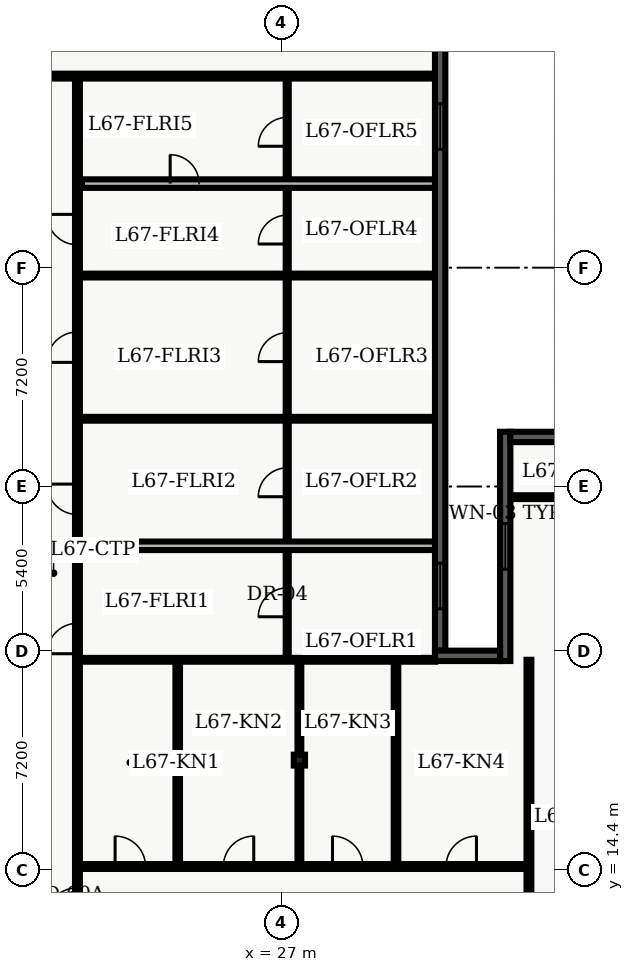
"""IFC4 building model, lengths in metres.
Left out: names, types, materials, properties, quantities, classifications, styles, units other than length and angle.
Written with IfcOpenShell. Run it as: python <this file> out.ifc"""

import sys

from ifc_helpers import new_model, entity, si_unit, converted_unit, direction, frame, origin_with_axes, origin_2d_with_axis, place, context, subcontext, project, spatial, polyline, rectangle, i_section, outline, extrude, element, fill, save


model = new_model("IFC4")
c1 = context("Model", 3, precision=1e-05, world=origin_with_axes(), true_north=direction((0.0, 1.0)))
c2 = subcontext(c1, "Body", "Model", "MODEL_VIEW")
j1 = project(units=[si_unit("LENGTHUNIT", "METRE"), converted_unit("PLANEANGLEUNIT", "DEGREE", entity("IfcPlaneAngleMeasure", 0.017), si_unit("PLANEANGLEUNIT", "RADIAN"), dimensions=[0, 0, 0, 0, 0, 0, 0])], contexts=[c1])
p1 = place(None, origin_with_axes())
s1 = spatial("IfcSite", under=j1, at=p1, CompositionType="ELEMENT")
p2 = place(p1, origin_with_axes())
s2 = spatial("IfcBuilding", under=s1, at=p2, CompositionType="ELEMENT")
p3 = place(p2, frame((0.0, 0.0, 272.4), z_axis=(0.0, 0.0, 1.0), x_axis=(1.0, 0.0, 0.0)))
s3 = spatial("IfcBuildingStorey", under=s2, at=p3, CompositionType="ELEMENT", Elevation=272.4)
p4 = place(p3, frame((27.6, 18.0, 0.0), z_axis=(0.0, 0.0, 1.0), x_axis=(1.0, 0.0, 0.0)))
e1 = element("IfcColumn", 1, at=p4, inside=s3, PredefinedType="COLUMN", context=c2, shape_type="SweptSolid", body=[
    extrude(i_section(OverallWidth=0.369, OverallDepth=0.356, WebThickness=0.011, FlangeThickness=0.018, FilletRadius=0.018, at=origin_2d_with_axis()), origin_with_axes(), (0.0, 0.0, 1.0), 3.9),
])
p5 = place(p3, frame((8.135, 40.5, 0.0), z_axis=(0.0, 0.0, 1.0), x_axis=(1.0, 0.0, 0.0)))
e2 = element("IfcWall", 2, at=p5, inside=s3, PredefinedType="PARTITIONING", context=c2, shape_type="SweptSolid", body=[
    extrude(outline(polyline([(0.0, -0.08), (23.93, -0.08), (23.93, 0.08), (0.0, 0.08), (0.0, -0.08)])), origin_with_axes(), (0.0, 0.0, 1.0), 2.7),
])
p6 = place(p5, frame((0.76, 0.0, 0.0), z_axis=(0.0, 0.0, 1.0), x_axis=(1.0, 0.0, 0.0)))
e3 = element("IfcOpeningElement", 3, at=p6, cuts=e2, PredefinedType="OPENING", context=c2, shape_type="SweptSolid", body=[
    extrude(rectangle(XDim=1.0, YDim=0.18, at=origin_2d_with_axis()), origin_with_axes(), (0.0, 0.0, 1.0), 2.15),
])
p7 = place(p5, frame((4.729, 0.0, 0.0), z_axis=(0.0, 0.0, 1.0), x_axis=(1.0, 0.0, 0.0)))
e4 = element("IfcOpeningElement", 4, at=p7, cuts=e2, PredefinedType="OPENING", context=c2, shape_type="SweptSolid", body=[
    extrude(rectangle(XDim=1.0, YDim=0.18, at=origin_2d_with_axis()), origin_with_axes(), (0.0, 0.0, 1.0), 2.15),
])
p8 = place(p5, frame((7.574, 0.0, 0.0), z_axis=(0.0, 0.0, 1.0), x_axis=(1.0, 0.0, 0.0)))
e5 = element("IfcOpeningElement", 5, at=p8, cuts=e2, PredefinedType="OPENING", context=c2, shape_type="SweptSolid", body=[
    extrude(rectangle(XDim=1.0, YDim=0.18, at=origin_2d_with_axis()), origin_with_axes(), (0.0, 0.0, 1.0), 2.15),
])
p9 = place(p5, frame((10.189, 0.0, 0.0), z_axis=(0.0, 0.0, 1.0), x_axis=(1.0, 0.0, 0.0)))
e6 = element("IfcOpeningElement", 6, at=p9, cuts=e2, PredefinedType="OPENING", context=c2, shape_type="SweptSolid", body=[
    extrude(rectangle(XDim=1.0, YDim=0.18, at=origin_2d_with_axis()), origin_with_axes(), (0.0, 0.0, 1.0), 2.15),
])
p10 = place(p3, frame((20.3, 7.8, 0.0), z_axis=(0.0, 0.0, 1.0), x_axis=(0.0, 1.0, 0.0)))
e7 = element("IfcWall", 7, at=p10, inside=s3, PredefinedType="PARTITIONING", context=c2, shape_type="SweptSolid", body=[
    extrude(outline(polyline([(0.0, -0.08), (32.7, -0.08), (32.7, 0.08), (0.0, 0.08), (0.0, -0.08)])), origin_with_axes(), (0.0, 0.0, 1.0), 2.7),
])
p11 = place(p10, frame((14.2, 0.0, 0.0), z_axis=(0.0, 0.0, 1.0), x_axis=(1.0, 0.0, 0.0)))
e8 = element("IfcOpeningElement", 8, at=p11, cuts=e7, PredefinedType="OPENING", context=c2, shape_type="SweptSolid", body=[
    extrude(rectangle(XDim=1.0, YDim=0.18, at=origin_2d_with_axis()), origin_with_axes(), (0.0, 0.0, 1.0), 2.15),
])
p12 = place(p10, frame((18.779, 0.0, 0.0), z_axis=(0.0, 0.0, 1.0), x_axis=(1.0, 0.0, 0.0)))
e9 = element("IfcOpeningElement", 9, at=p12, cuts=e7, PredefinedType="OPENING", context=c2, shape_type="SweptSolid", body=[
    extrude(rectangle(XDim=1.0, YDim=0.18, at=origin_2d_with_axis()), origin_with_axes(), (0.0, 0.0, 1.0), 2.15),
])
p13 = place(p10, frame((23.784, 0.0, 0.0), z_axis=(0.0, 0.0, 1.0), x_axis=(1.0, 0.0, 0.0)))
e10 = element("IfcOpeningElement", 10, at=p13, cuts=e7, PredefinedType="OPENING", context=c2, shape_type="SweptSolid", body=[
    extrude(rectangle(XDim=1.0, YDim=0.18, at=origin_2d_with_axis()), origin_with_axes(), (0.0, 0.0, 1.0), 2.15),
])
p14 = place(p10, frame((27.651, 0.0, 0.0), z_axis=(0.0, 0.0, 1.0), x_axis=(1.0, 0.0, 0.0)))
e11 = element("IfcOpeningElement", 11, at=p14, cuts=e7, PredefinedType="OPENING", context=c2, shape_type="SweptSolid", body=[
    extrude(rectangle(XDim=1.0, YDim=0.18, at=origin_2d_with_axis()), origin_with_axes(), (0.0, 0.0, 1.0), 2.15),
])
p15 = place(p10, frame((5.475, 0.0, 0.0), z_axis=(0.0, 0.0, 1.0), x_axis=(1.0, 0.0, 0.0)))
e12 = element("IfcOpeningElement", 12, at=p15, cuts=e7, PredefinedType="OPENING", context=c2, shape_type="SweptSolid", body=[
    extrude(rectangle(XDim=1.05, YDim=0.18, at=origin_2d_with_axis()), origin_with_axes(), (0.0, 0.0, 1.0), 2.15),
])
p16 = place(p3, frame((27.2, 21.4, 0.0), z_axis=(0.0, 0.0, 1.0), x_axis=(0.0, 1.0, 0.0)))
e13 = element("IfcWall", 13, at=p16, inside=s3, PredefinedType="PARTITIONING", context=c2, shape_type="SweptSolid", body=[
    extrude(outline(polyline([(0.0, -0.05), (18.9, -0.05), (18.9, 0.05), (0.0, 0.05), (0.0, -0.05)])), origin_with_axes(), (0.0, 0.0, 1.0), 2.7),
])
p17 = place(p16, frame((1.79, 0.0, 0.0), z_axis=(0.0, 0.0, 1.0), x_axis=(1.0, 0.0, 0.0)))
e14 = element("IfcOpeningElement", 14, at=p17, cuts=e13, PredefinedType="OPENING", context=c2, shape_type="SweptSolid", body=[
    extrude(rectangle(XDim=0.95, YDim=0.12, at=origin_2d_with_axis()), origin_with_axes(), (0.0, 0.0, 1.0), 2.15),
])
p18 = place(p16, frame((5.739, 0.0, 0.0), z_axis=(0.0, 0.0, 1.0), x_axis=(1.0, 0.0, 0.0)))
e15 = element("IfcOpeningElement", 15, at=p18, cuts=e13, PredefinedType="OPENING", context=c2, shape_type="SweptSolid", body=[
    extrude(rectangle(XDim=0.95, YDim=0.12, at=origin_2d_with_axis()), origin_with_axes(), (0.0, 0.0, 1.0), 2.15),
])
p19 = place(p16, frame((10.184, 0.0, 0.0), z_axis=(0.0, 0.0, 1.0), x_axis=(1.0, 0.0, 0.0)))
e16 = element("IfcOpeningElement", 16, at=p19, cuts=e13, PredefinedType="OPENING", context=c2, shape_type="SweptSolid", body=[
    extrude(rectangle(XDim=0.95, YDim=0.12, at=origin_2d_with_axis()), origin_with_axes(), (0.0, 0.0, 1.0), 2.15),
])
p20 = place(p16, frame((14.052, 0.0, 0.0), z_axis=(0.0, 0.0, 1.0), x_axis=(1.0, 0.0, 0.0)))
e17 = element("IfcOpeningElement", 17, at=p20, cuts=e13, PredefinedType="OPENING", context=c2, shape_type="SweptSolid", body=[
    extrude(rectangle(XDim=0.95, YDim=0.12, at=origin_2d_with_axis()), origin_with_axes(), (0.0, 0.0, 1.0), 2.15),
])
p21 = place(p16, frame((17.267, 0.0, 0.0), z_axis=(0.0, 0.0, 1.0), x_axis=(1.0, 0.0, 0.0)))
e18 = element("IfcOpeningElement", 18, at=p21, cuts=e13, PredefinedType="OPENING", context=c2, shape_type="SweptSolid", body=[
    extrude(rectangle(XDim=0.95, YDim=0.12, at=origin_2d_with_axis()), origin_with_axes(), (0.0, 0.0, 1.0), 2.15),
])
p22 = place(p3, frame((20.45, 25.05, 0.0), z_axis=(0.0, 0.0, 1.0), x_axis=(1.0, 0.0, 0.0)))
e19 = element("IfcWall", 19, at=p22, inside=s3, PredefinedType="PARTITIONING", context=c2, shape_type="SweptSolid", body=[
    extrude(outline(polyline([(0.0, -0.14), (11.615, -0.14), (11.615, 0.14), (0.0, 0.14), (0.0, -0.14)])), origin_with_axes(), (0.0, 0.0, 1.0), 2.7),
])
for number, where, z_axis, x_axis in (
    (20, (20.45, 29.228, 0.0), (0.0, 0.0, 1.0), (1.0, 0.0, 0.0)),
    (21, (20.45, 33.939, 0.0), (0.0, 0.0, 1.0), (1.0, 0.0, 0.0)),
):
    element("IfcWall", number, at=place(p3, frame(where, z_axis=z_axis, x_axis=x_axis)), inside=s3, PredefinedType="PARTITIONING", context=c2, shape_type="SweptSolid", body=[
        extrude(outline(polyline([(0.0, -0.062), (11.615, -0.062), (11.615, 0.062), (0.0, 0.062), (0.0, -0.062)])), origin_with_axes(), (0.0, 0.0, 1.0), 2.7),
    ])
p23 = place(p3, frame((20.45, 36.964, 0.0), z_axis=(0.0, 0.0, 1.0), x_axis=(1.0, 0.0, 0.0)))
e22 = element("IfcWall", 22, at=p23, inside=s3, PredefinedType="PARTITIONING", context=c2, shape_type="SweptSolid", body=[
    extrude(outline(polyline([(0.0, -0.14), (11.615, -0.14), (11.615, 0.14), (0.0, 0.14), (0.0, -0.14)])), origin_with_axes(), (0.0, 0.0, 1.0), 2.7),
])
p24 = place(p23, frame((3.375, 0.0, 0.0), z_axis=(0.0, 0.0, 1.0), x_axis=(1.0, 0.0, 0.0)))
e23 = element("IfcOpeningElement", 23, at=p24, cuts=e22, PredefinedType="OPENING", context=c2, shape_type="SweptSolid", body=[
    extrude(rectangle(XDim=0.95, YDim=0.3, at=origin_2d_with_axis()), origin_with_axes(), (0.0, 0.0, 1.0), 2.15),
])
p25 = place(p3, frame((20.3, 14.5, 0.0), z_axis=(0.0, 0.0, 1.0), x_axis=(1.0, 0.0, 0.0)))
e24 = element("IfcWall", 24, at=p25, inside=s3, PredefinedType="PARTITIONING", context=c2, shape_type="SweptSolid", body=[
    extrude(outline(polyline([(0.0, -0.08), (14.85, -0.08), (14.85, 0.08), (0.0, 0.08), (0.0, -0.08)])), origin_with_axes(), (0.0, 0.0, 1.0), 2.7),
])
p26 = place(p25, frame((1.739, 0.0, 0.0), z_axis=(0.0, 0.0, 1.0), x_axis=(1.0, 0.0, 0.0)))
e25 = element("IfcOpeningElement", 25, at=p26, cuts=e24, PredefinedType="OPENING", context=c2, shape_type="SweptSolid", body=[
    extrude(rectangle(XDim=1.0, YDim=0.18, at=origin_2d_with_axis()), origin_with_axes(), (0.0, 0.0, 1.0), 2.15),
])
p27 = place(p25, frame((5.299, 0.0, 0.0), z_axis=(0.0, 0.0, 1.0), x_axis=(1.0, 0.0, 0.0)))
e26 = element("IfcOpeningElement", 26, at=p27, cuts=e24, PredefinedType="OPENING", context=c2, shape_type="SweptSolid", body=[
    extrude(rectangle(XDim=1.0, YDim=0.18, at=origin_2d_with_axis()), origin_with_axes(), (0.0, 0.0, 1.0), 2.15),
])
p28 = place(p25, frame((8.889, 0.0, 0.0), z_axis=(0.0, 0.0, 1.0), x_axis=(1.0, 0.0, 0.0)))
e27 = element("IfcOpeningElement", 27, at=p28, cuts=e24, PredefinedType="OPENING", context=c2, shape_type="SweptSolid", body=[
    extrude(rectangle(XDim=1.0, YDim=0.18, at=origin_2d_with_axis()), origin_with_axes(), (0.0, 0.0, 1.0), 2.15),
])
p29 = place(p25, frame((12.624, 0.0, 0.0), z_axis=(0.0, 0.0, 1.0), x_axis=(1.0, 0.0, 0.0)))
e28 = element("IfcOpeningElement", 28, at=p29, cuts=e24, PredefinedType="OPENING", context=c2, shape_type="SweptSolid", body=[
    extrude(rectangle(XDim=1.0, YDim=0.18, at=origin_2d_with_axis()), origin_with_axes(), (0.0, 0.0, 1.0), 2.15),
])
p30 = place(p3, frame((35.15, 4.35, 0.0), z_axis=(0.0, 0.0, 1.0), x_axis=(0.0, 1.0, 0.0)))
e29 = element("IfcWall", 29, at=p30, inside=s3, PredefinedType="PARTITIONING", context=c2, shape_type="SweptSolid", body=[
    extrude(outline(polyline([(0.0, -0.08), (16.95, -0.08), (16.95, 0.08), (0.0, 0.08), (0.0, -0.08)])), origin_with_axes(), (0.0, 0.0, 1.0), 2.7),
])
p31 = place(p3, frame((23.598, 14.62, 0.0), z_axis=(0.0, 0.0, 1.0), x_axis=(0.0, 1.0, 0.0)))
e30 = element("IfcWall", 30, at=p31, inside=s3, PredefinedType="PARTITIONING", context=c2, shape_type="SweptSolid", body=[
    extrude(outline(polyline([(0.0, -0.075), (6.6, -0.075), (6.6, 0.075), (0.0, 0.075), (0.0, -0.075)])), origin_with_axes(), (0.0, 0.0, 1.0), 2.7),
])
p32 = place(p3, frame((27.6, 14.62, 0.0), z_axis=(0.0, 0.0, 1.0), x_axis=(0.0, 1.0, 0.0)))
e31 = element("IfcWall", 31, at=p32, inside=s3, PredefinedType="PARTITIONING", context=c2, shape_type="SweptSolid", body=[
    extrude(outline(polyline([(0.0, -0.062), (6.6, -0.062), (6.6, 0.062), (0.0, 0.062), (0.0, -0.062)])), origin_with_axes(), (0.0, 0.0, 1.0), 2.7),
])
p33 = place(p3, frame((30.778, 14.62, 0.0), z_axis=(0.0, 0.0, 1.0), x_axis=(0.0, 1.0, 0.0)))
e32 = element("IfcWall", 32, at=p33, inside=s3, PredefinedType="PARTITIONING", context=c2, shape_type="SweptSolid", body=[
    extrude(outline(polyline([(0.0, -0.075), (6.6, -0.075), (6.6, 0.075), (0.0, 0.075), (0.0, -0.075)])), origin_with_axes(), (0.0, 0.0, 1.0), 2.7),
])
p34 = place(p3, frame((34.535, 26.65, 0.0), z_axis=(0.0, 0.0, 1.0), x_axis=(1.0, 0.0, 0.0)))
e33 = element("IfcWall", 33, at=p34, inside=s3, PredefinedType="PARTITIONING", context=c2, shape_type="SweptSolid", body=[
    extrude(outline(polyline([(0.0, -0.062), (12.995, -0.062), (12.995, 0.062), (0.0, 0.062), (0.0, -0.062)])), origin_with_axes(), (0.0, 0.0, 1.0), 2.7),
])
p35 = place(p34, frame((8.465, 0.0, 0.0), z_axis=(0.0, 0.0, 1.0), x_axis=(1.0, 0.0, 0.0)))
e34 = element("IfcOpeningElement", 34, at=p35, cuts=e33, PredefinedType="OPENING", context=c2, shape_type="SweptSolid", body=[
    extrude(rectangle(XDim=1.0, YDim=0.145, at=origin_2d_with_axis()), origin_with_axes(), (0.0, 0.0, 1.0), 2.15),
])
p36 = place(p3, frame((20.3, 21.3, 0.0), z_axis=(0.0, 0.0, 1.0), x_axis=(1.0, 0.0, 0.0)))
e35 = element("IfcWall", 35, at=p36, inside=s3, PredefinedType="PARTITIONING", context=c2, shape_type="SweptSolid", body=[
    extrude(outline(polyline([(0.0, -0.062), (11.765, -0.062), (11.765, 0.062), (0.0, 0.062), (0.0, -0.062)])), origin_with_axes(), (0.0, 0.0, 1.0), 2.7),
])
p37 = place(p3, frame((34.37, 21.26, 0.0), z_axis=(0.0, 0.0, 1.0), x_axis=(0.0, 1.0, 0.0)))
e36 = element("IfcWall", 36, at=p37, inside=s3, PredefinedType="SOLIDWALL", context=c2, shape_type="SweptSolid", body=[
    extrude(outline(polyline([(0.0, -0.17), (7.54, -0.17), (7.54, 0.17), (0.0, 0.17), (0.0, -0.17)])), origin_with_axes(), (0.0, 0.0, 1.0), 3.66),
])
p38 = place(p37, frame((3.77, 0.0, 0.45), z_axis=(0.0, 0.0, 1.0), x_axis=(1.0, 0.0, 0.0)))
e37 = element("IfcOpeningElement", 37, at=p38, cuts=e36, PredefinedType="OPENING", context=c2, shape_type="SweptSolid", body=[
    extrude(rectangle(XDim=1.5, YDim=0.36, at=origin_2d_with_axis()), origin_with_axes(), (0.0, 0.0, 1.0), 2.1),
])
p39 = place(p3, frame((34.54, 28.63, 0.0), z_axis=(0.0, 0.0, 1.0), x_axis=(1.0, 0.0, 0.0)))
e38 = element("IfcWall", 38, at=p39, inside=s3, PredefinedType="SOLIDWALL", context=c2, shape_type="SweptSolid", body=[
    extrude(outline(polyline([(0.0, -0.17), (13.16, -0.17), (13.16, 0.17), (0.0, 0.17), (0.0, -0.17)])), origin_with_axes(), (0.0, 0.0, 1.0), 3.66),
])
p40 = place(p39, frame((3.59, 0.0, 0.45), z_axis=(0.0, 0.0, 1.0), x_axis=(1.0, 0.0, 0.0)))
e39 = element("IfcOpeningElement", 39, at=p40, cuts=e38, PredefinedType="OPENING", context=c2, shape_type="SweptSolid", body=[
    extrude(rectangle(XDim=1.5, YDim=0.36, at=origin_2d_with_axis()), origin_with_axes(), (0.0, 0.0, 1.0), 2.1),
])
p41 = place(p39, frame((9.57, 0.0, 0.45), z_axis=(0.0, 0.0, 1.0), x_axis=(1.0, 0.0, 0.0)))
e40 = element("IfcOpeningElement", 40, at=p41, cuts=e38, PredefinedType="OPENING", context=c2, shape_type="SweptSolid", body=[
    extrude(rectangle(XDim=1.5, YDim=0.36, at=origin_2d_with_axis()), origin_with_axes(), (0.0, 0.0, 1.0), 2.1),
])
p42 = place(p3, frame((32.23, 41.82, 0.0), z_axis=(0.0, 0.0, 1.0), x_axis=(0.0, -1.0, 0.0)))
e41 = element("IfcWall", 41, at=p42, inside=s3, PredefinedType="SOLIDWALL", context=c2, shape_type="SweptSolid", body=[
    extrude(outline(polyline([(0.0, -0.17), (20.22, -0.17), (20.22, 0.17), (0.0, 0.17), (0.0, -0.17)])), origin_with_axes(), (0.0, 0.0, 1.0), 3.66),
])
p43 = place(p42, frame((2.978, 0.0, 0.45), z_axis=(0.0, 0.0, 1.0), x_axis=(1.0, 0.0, 0.0)))
e42 = element("IfcOpeningElement", 42, at=p43, cuts=e41, PredefinedType="OPENING", context=c2, shape_type="SweptSolid", body=[
    extrude(rectangle(XDim=1.5, YDim=0.36, at=origin_2d_with_axis()), origin_with_axes(), (0.0, 0.0, 1.0), 2.1),
])
p44 = place(p42, frame((18.092, 0.0, 0.45), z_axis=(0.0, 0.0, 1.0), x_axis=(1.0, 0.0, 0.0)))
e43 = element("IfcOpeningElement", 43, at=p44, cuts=e41, PredefinedType="OPENING", context=c2, shape_type="SweptSolid", body=[
    extrude(rectangle(XDim=1.5, YDim=0.36, at=origin_2d_with_axis()), origin_with_axes(), (0.0, 0.0, 1.0), 2.1),
])
p45 = place(p3, frame((32.06, 21.43, 0.0), z_axis=(0.0, 0.0, 1.0), x_axis=(1.0, 0.0, 0.0)))
e44 = element("IfcWall", 44, at=p45, inside=s3, PredefinedType="SOLIDWALL", context=c2, shape_type="SweptSolid", body=[
    extrude(outline(polyline([(0.0, -0.17), (2.14, -0.17), (2.14, 0.17), (0.0, 0.17), (0.0, -0.17)])), origin_with_axes(), (0.0, 0.0, 1.0), 3.66),
])
p46 = place(p16, frame((1.79, 0.0, 0.0), z_axis=(0.0, 0.0, 1.0), x_axis=(1.0, 0.0, 0.0)))
e45 = element("IfcDoor", 45, at=p46, inside=s3, OperationType="SINGLE_SWING_LEFT", PredefinedType="DOOR", context=c2, shape_type="SweptSolid", body=[
    extrude(rectangle(XDim=0.95, YDim=0.06, at=origin_2d_with_axis()), origin_with_axes(), (0.0, 0.0, 1.0), 2.15),
])
fill(e14, e45)
p47 = place(p10, frame((14.2, 0.0, 0.0), z_axis=(0.0, 0.0, 1.0), x_axis=(1.0, 0.0, 0.0)))
e46 = element("IfcDoor", 46, at=p47, inside=s3, OperationType="SINGLE_SWING_LEFT", PredefinedType="DOOR", context=c2, shape_type="SweptSolid", body=[
    extrude(rectangle(XDim=1.0, YDim=0.09, at=origin_2d_with_axis()), origin_with_axes(), (0.0, 0.0, 1.0), 2.15),
])
fill(e8, e46)
p48 = place(p16, frame((5.739, 0.0, 0.0), z_axis=(0.0, 0.0, 1.0), x_axis=(1.0, 0.0, 0.0)))
e47 = element("IfcDoor", 47, at=p48, inside=s3, OperationType="SINGLE_SWING_LEFT", PredefinedType="DOOR", context=c2, shape_type="SweptSolid", body=[
    extrude(rectangle(XDim=0.95, YDim=0.06, at=origin_2d_with_axis()), origin_with_axes(), (0.0, 0.0, 1.0), 2.15),
])
fill(e15, e47)
p49 = place(p10, frame((18.779, 0.0, 0.0), z_axis=(0.0, 0.0, 1.0), x_axis=(1.0, 0.0, 0.0)))
e48 = element("IfcDoor", 48, at=p49, inside=s3, OperationType="SINGLE_SWING_RIGHT", PredefinedType="DOOR", context=c2, shape_type="SweptSolid", body=[
    extrude(rectangle(XDim=1.0, YDim=0.09, at=origin_2d_with_axis()), origin_with_axes(), (0.0, 0.0, 1.0), 2.15),
])
fill(e9, e48)
p50 = place(p16, frame((10.184, 0.0, 0.0), z_axis=(0.0, 0.0, 1.0), x_axis=(1.0, 0.0, 0.0)))
e49 = element("IfcDoor", 49, at=p50, inside=s3, OperationType="SINGLE_SWING_LEFT", PredefinedType="DOOR", context=c2, shape_type="SweptSolid", body=[
    extrude(rectangle(XDim=0.95, YDim=0.06, at=origin_2d_with_axis()), origin_with_axes(), (0.0, 0.0, 1.0), 2.15),
])
fill(e16, e49)
p51 = place(p10, frame((23.784, 0.0, 0.0), z_axis=(0.0, 0.0, 1.0), x_axis=(1.0, 0.0, 0.0)))
e50 = element("IfcDoor", 50, at=p51, inside=s3, OperationType="SINGLE_SWING_LEFT", PredefinedType="DOOR", context=c2, shape_type="SweptSolid", body=[
    extrude(rectangle(XDim=1.0, YDim=0.09, at=origin_2d_with_axis()), origin_with_axes(), (0.0, 0.0, 1.0), 2.15),
])
fill(e10, e50)
p52 = place(p16, frame((14.052, 0.0, 0.0), z_axis=(0.0, 0.0, 1.0), x_axis=(1.0, 0.0, 0.0)))
e51 = element("IfcDoor", 51, at=p52, inside=s3, OperationType="SINGLE_SWING_LEFT", PredefinedType="DOOR", context=c2, shape_type="SweptSolid", body=[
    extrude(rectangle(XDim=0.95, YDim=0.06, at=origin_2d_with_axis()), origin_with_axes(), (0.0, 0.0, 1.0), 2.15),
])
fill(e17, e51)
p53 = place(p10, frame((27.651, 0.0, 0.0), z_axis=(0.0, 0.0, 1.0), x_axis=(1.0, 0.0, 0.0)))
e52 = element("IfcDoor", 52, at=p53, inside=s3, OperationType="SINGLE_SWING_RIGHT", PredefinedType="DOOR", context=c2, shape_type="SweptSolid", body=[
    extrude(rectangle(XDim=1.0, YDim=0.09, at=origin_2d_with_axis()), origin_with_axes(), (0.0, 0.0, 1.0), 2.15),
])
fill(e11, e52)
p54 = place(p16, frame((17.267, 0.0, 0.0), z_axis=(0.0, 0.0, 1.0), x_axis=(1.0, 0.0, 0.0)))
e53 = element("IfcDoor", 53, at=p54, inside=s3, OperationType="SINGLE_SWING_LEFT", PredefinedType="DOOR", context=c2, shape_type="SweptSolid", body=[
    extrude(rectangle(XDim=0.95, YDim=0.06, at=origin_2d_with_axis()), origin_with_axes(), (0.0, 0.0, 1.0), 2.15),
])
fill(e18, e53)
p55 = place(p23, frame((3.375, 0.0, 0.0), z_axis=(0.0, 0.0, 1.0), x_axis=(1.0, 0.0, 0.0)))
e54 = element("IfcDoor", 54, at=p55, inside=s3, OperationType="SINGLE_SWING_LEFT", PredefinedType="DOOR", context=c2, shape_type="SweptSolid", body=[
    extrude(rectangle(XDim=0.95, YDim=0.09, at=origin_2d_with_axis()), origin_with_axes(), (0.0, 0.0, 1.0), 2.15),
])
fill(e23, e54)
p56 = place(p10, frame((5.475, 0.0, 0.0), z_axis=(0.0, 0.0, 1.0), x_axis=(1.0, 0.0, 0.0)))
e55 = element("IfcDoor", 55, at=p56, inside=s3, OperationType="SINGLE_SWING_LEFT", PredefinedType="DOOR", context=c2, shape_type="SweptSolid", body=[
    extrude(rectangle(XDim=1.05, YDim=0.09, at=origin_2d_with_axis()), origin_with_axes(), (0.0, 0.0, 1.0), 2.15),
])
fill(e12, e55)
p57 = place(p25, frame((1.739, 0.0, 0.0), z_axis=(0.0, 0.0, 1.0), x_axis=(1.0, 0.0, 0.0)))
e56 = element("IfcDoor", 56, at=p57, inside=s3, OperationType="SINGLE_SWING_LEFT", PredefinedType="DOOR", context=c2, shape_type="SweptSolid", body=[
    extrude(rectangle(XDim=1.0, YDim=0.09, at=origin_2d_with_axis()), origin_with_axes(), (0.0, 0.0, 1.0), 2.15),
])
fill(e25, e56)
p58 = place(p25, frame((5.299, 0.0, 0.0), z_axis=(0.0, 0.0, 1.0), x_axis=(1.0, 0.0, 0.0)))
e57 = element("IfcDoor", 57, at=p58, inside=s3, OperationType="SINGLE_SWING_RIGHT", PredefinedType="DOOR", context=c2, shape_type="SweptSolid", body=[
    extrude(rectangle(XDim=1.0, YDim=0.09, at=origin_2d_with_axis()), origin_with_axes(), (0.0, 0.0, 1.0), 2.15),
])
fill(e26, e57)
p59 = place(p25, frame((8.889, 0.0, 0.0), z_axis=(0.0, 0.0, 1.0), x_axis=(1.0, 0.0, 0.0)))
e58 = element("IfcDoor", 58, at=p59, inside=s3, OperationType="SINGLE_SWING_LEFT", PredefinedType="DOOR", context=c2, shape_type="SweptSolid", body=[
    extrude(rectangle(XDim=1.0, YDim=0.09, at=origin_2d_with_axis()), origin_with_axes(), (0.0, 0.0, 1.0), 2.15),
])
fill(e27, e58)
p60 = place(p25, frame((12.624, 0.0, 0.0), z_axis=(0.0, 0.0, 1.0), x_axis=(1.0, 0.0, 0.0)))
e59 = element("IfcDoor", 59, at=p60, inside=s3, OperationType="SINGLE_SWING_RIGHT", PredefinedType="DOOR", context=c2, shape_type="SweptSolid", body=[
    extrude(rectangle(XDim=1.0, YDim=0.09, at=origin_2d_with_axis()), origin_with_axes(), (0.0, 0.0, 1.0), 2.15),
])
fill(e28, e59)
p61 = place(p37, frame((3.77, 0.0, 0.45), z_axis=(0.0, 0.0, 1.0), x_axis=(1.0, 0.0, 0.0)))
e60 = element("IfcWindow", 60, at=p61, inside=s3, PredefinedType="WINDOW", context=c2, shape_type="SweptSolid", body=[
    extrude(rectangle(XDim=1.5, YDim=0.09, at=origin_2d_with_axis()), origin_with_axes(), (0.0, 0.0, 1.0), 2.1),
])
fill(e37, e60)
p62 = place(p42, frame((2.978, 0.0, 0.45), z_axis=(0.0, 0.0, 1.0), x_axis=(1.0, 0.0, 0.0)))
e61 = element("IfcWindow", 61, at=p62, inside=s3, PredefinedType="WINDOW", context=c2, shape_type="SweptSolid", body=[
    extrude(rectangle(XDim=1.5, YDim=0.09, at=origin_2d_with_axis()), origin_with_axes(), (0.0, 0.0, 1.0), 2.1),
])
fill(e42, e61)
p63 = place(p42, frame((18.092, 0.0, 0.45), z_axis=(0.0, 0.0, 1.0), x_axis=(1.0, 0.0, 0.0)))
e62 = element("IfcWindow", 62, at=p63, inside=s3, PredefinedType="WINDOW", context=c2, shape_type="SweptSolid", body=[
    extrude(rectangle(XDim=1.5, YDim=0.09, at=origin_2d_with_axis()), origin_with_axes(), (0.0, 0.0, 1.0), 2.1),
])
fill(e43, e62)
save(model, sys.argv[1])
